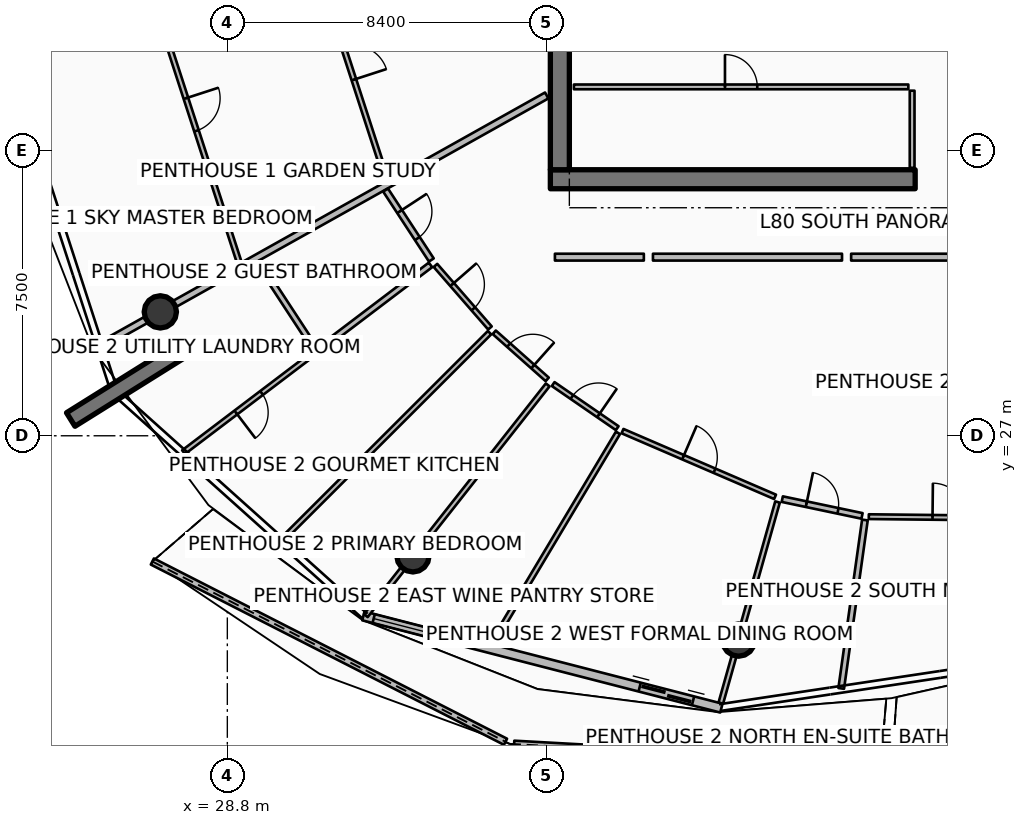
"""IFC4 building model, lengths in metres.
Left out: names, types, materials, properties, quantities, classifications, styles, units other than length and angle.
Written with IfcOpenShell. Run it as: python <this file> out.ifc"""

import sys

from ifc_helpers import new_model, si_unit, direction, frame, frame_2d, origin, origin_2d, place, context, subcontext, project, spatial, polyline, rectangle, circle, outline, extrude, element, fill, save


model = new_model("IFC4")
c1 = context("Model", 3, precision=1e-05, world=origin(), true_north=direction((0.0, 1.0)))
c2 = subcontext(c1, "Body", "Model", "MODEL_VIEW")
j1 = project(units=[si_unit("LENGTHUNIT", "METRE"), si_unit("PLANEANGLEUNIT", "RADIAN")], contexts=[c1])
p1 = place(None, origin())
s1 = spatial("IfcSite", under=j1, at=p1, CompositionType="ELEMENT")
p2 = place(p1, origin())
s2 = spatial("IfcBuilding", under=s1, at=p2, CompositionType="ELEMENT")
p3 = place(p2, frame((0.0, 0.0, 317.9)))
s3 = spatial("IfcBuildingStorey", under=s2, at=p3, CompositionType="ELEMENT", Elevation=317.9)
p4 = place(p3, frame((37.3, 33.75, 0.0), z_axis=(0.0, 0.0, 1.0), x_axis=(1.0, 0.0, 0.0)))
e1 = element("IfcWall", 1, at=p4, inside=s3, PredefinedType="SHEAR", context=c2, shape_type="SweptSolid", body=[
    extrude(rectangle(XDim=9.6, YDim=0.5, at=frame_2d((4.8, 0.0))), origin(), (0.0, 0.0, 1.0), 4.2),
])
p5 = place(p3, frame((37.55, 34.0, 0.0), z_axis=(0.0, 0.0, 1.0), x_axis=(0.0, 1.0, 0.0)))
e2 = element("IfcWall", 2, at=p5, inside=s3, PredefinedType="SHEAR", context=c2, shape_type="SweptSolid", body=[
    extrude(rectangle(XDim=16.0, YDim=0.5, at=frame_2d((8.0, 0.0))), origin(), (0.0, 0.0, 1.0), 4.2),
])
p6 = place(p3, frame((27.647, 29.282, 0.0), z_axis=(0.0, 0.0, 1.0), x_axis=(-0.848053161125, -0.529911158502, 0.0)))
e3 = element("IfcWall", 3, at=p6, inside=s3, PredefinedType="SOLIDWALL", context=c2, shape_type="SweptSolid", body=[
    extrude(rectangle(XDim=3.5, YDim=0.42, at=frame_2d((1.75, 0.0))), origin(), (0.0, 0.0, 1.0), 4.2),
])
for number, where, z_axis, x_axis in (
    (4, (27.037, 30.26, 0.0), (0.0, 0.0, 1.0), (1.0, 0.0, 0.0)),
    (5, (33.684, 23.841, 0.0), (0.0, 0.0, 1.0), (1.0, 0.0, 0.0)),
    (6, (42.253, 21.624, 0.0), (0.0, 0.0, 1.0), (1.0, 0.0, 0.0)),
):
    element("IfcColumn", number, at=place(p3, frame(where, z_axis=z_axis, x_axis=x_axis)), inside=s3, PredefinedType="COLUMN", context=c2, shape_type="SweptSolid", body=[
        extrude(circle(Radius=0.425, at=origin_2d()), origin(), (0.0, 0.0, 1.0), 3.94),
    ])
p7 = place(p3, frame((26.827, 23.692, 0.0), z_axis=(0.0, 0.0, 1.0), x_axis=(0.890680467367, -0.454629854993, 0.0)))
e7 = element("IfcWall", 7, at=p7, inside=s3, PredefinedType="PARAPET", context=c2, shape_type="SweptSolid", body=[
    extrude(outline(polyline([(0.0, 0.0), (10.434, 0.0), (10.433, 1.148), (5.217, 1.284), (0.0, 1.483), (0.0, 0.0)])), frame((0.0, 0.09, 0.0), z_axis=(0.0, -1.0, 0.0), x_axis=(1.0, 0.0, 0.0)), (0.0, 0.0, 1.0), 0.18),
])
p8 = place(p3, frame((36.347, 18.887, 0.0), z_axis=(0.0, 0.0, 1.0), x_axis=(0.998473232728, -0.055237700226, 0.0)))
e8 = element("IfcWall", 8, at=p8, inside=s3, PredefinedType="PARAPET", context=c2, shape_type="SweptSolid", body=[
    extrude(outline(polyline([(0.0, 0.0), (9.662, 0.0), (9.662, 1.224), (4.831, 1.127), (0.0, 1.148), (0.0, 0.0)])), frame((0.0, 0.09, 0.0), z_axis=(0.0, -1.0, 0.0), x_axis=(1.0, 0.0, 0.0)), (0.0, 0.0, 1.0), 0.18),
])
p9 = place(p3, frame((46.286, 18.383, 0.0), z_axis=(0.0, 0.0, 1.0), x_axis=(0.982839498698, 0.184462787028, 0.0)))
e9 = element("IfcWall", 9, at=p9, inside=s3, PredefinedType="PARAPET", context=c2, shape_type="SweptSolid", body=[
    extrude(outline(polyline([(0.0, 0.0), (8.882, 0.0), (8.882, 1.632), (4.441, 1.418), (0.0, 1.233), (0.0, 0.0)])), frame((0.0, 0.09, 0.0), z_axis=(0.0, -1.0, 0.0), x_axis=(1.0, 0.0, 0.0)), (0.0, 0.0, 1.0), 0.18),
])
p10 = place(p3, frame((32.38, 22.26, 0.0), z_axis=(0.0, 0.0, 1.0), x_axis=(0.968389076094, -0.249444577616, 0.0)))
e10 = element("IfcWall", 10, at=p10, inside=s3, PredefinedType="SOLIDWALL", context=c2, shape_type="SweptSolid", body=[
    extrude(rectangle(XDim=9.728, YDim=0.24, at=frame_2d((4.864, 0.0))), origin(), (0.0, 0.0, 1.0), 2.89),
])
p11 = place(p10, frame((7.508, 0.0, 0.0)))
e11 = element("IfcOpeningElement", 11, at=p11, cuts=e10, PredefinedType="OPENING", context=c2, shape_type="SweptSolid", body=[
    extrude(rectangle(XDim=1.45, YDim=2.15, at=frame_2d((0.725, 1.075))), frame((0.0, 0.13, 0.0), z_axis=(0.0, -1.0, 0.0), x_axis=(1.0, 0.0, 0.0)), (0.0, 0.0, 1.0), 0.26),
])
p12 = place(p10, frame((0.28, 0.0, 0.65)))
e12 = element("IfcOpeningElement", 12, at=p12, cuts=e10, PredefinedType="OPENING", context=c2, shape_type="SweptSolid", body=[
    extrude(rectangle(XDim=1.6, YDim=1.5, at=frame_2d((0.8, 0.75))), frame((0.0, 0.13, 0.0), z_axis=(0.0, -1.0, 0.0), x_axis=(1.0, 0.0, 0.0)), (0.0, 0.0, 1.0), 0.26),
])
p13 = place(p3, frame((46.82, 34.05, 0.0), z_axis=(0.0, 0.0, 1.0), x_axis=(0.0, 1.0, 0.0)))
e13 = element("IfcWall", 13, at=p13, inside=s3, PredefinedType="PARTITIONING", context=c2, shape_type="SweptSolid", body=[
    extrude(rectangle(XDim=2.03, YDim=0.125, at=frame_2d((1.015, 0.0))), origin(), (0.0, 0.0, 1.0), 3.38),
])
p14 = place(p3, frame((37.92, 36.18, 0.0), z_axis=(0.0, 0.0, 1.0), x_axis=(1.0, 0.0, 0.0)))
e14 = element("IfcWall", 14, at=p14, inside=s3, PredefinedType="PARTITIONING", context=c2, shape_type="SweptSolid", body=[
    extrude(rectangle(XDim=8.8, YDim=0.125, at=frame_2d((4.4, 0.0))), origin(), (0.0, 0.0, 1.0), 3.38),
])
p15 = place(p14, frame((3.975, 0.0, 0.0)))
e15 = element("IfcOpeningElement", 15, at=p15, cuts=e14, PredefinedType="OPENING", context=c2, shape_type="SweptSolid", body=[
    extrude(rectangle(XDim=0.85, YDim=2.06, at=frame_2d((0.425, 1.03))), frame((0.0, 0.073, 0.0), z_axis=(0.0, -1.0, 0.0), x_axis=(1.0, 0.0, 0.0)), (0.0, 0.0, 1.0), 0.145),
])
p16 = place(p3, frame((37.204, 35.954, 0.0), z_axis=(0.0, 0.0, 1.0), x_axis=(-0.872495191914, -0.488622697064, 0.0)))
e16 = element("IfcWall", 16, at=p16, inside=s3, PredefinedType="PARTITIONING", context=c2, shape_type="SweptSolid", body=[
    extrude(rectangle(XDim=13.462, YDim=0.18, at=frame_2d((6.731, 0.0))), origin(), (0.0, 0.0, 1.0), 3.38),
])
p17 = place(p3, frame((30.99, 39.878, 0.0), z_axis=(0.0, 0.0, 1.0), x_axis=(0.309026406972, -0.951053457905, 0.0)))
e17 = element("IfcWall", 17, at=p17, inside=s3, PredefinedType="PARTITIONING", context=c2, shape_type="SweptSolid", body=[
    extrude(rectangle(XDim=6.477, YDim=0.125, at=frame_2d((3.238, 0.0))), origin(), (0.0, 0.0, 1.0), 3.38),
])
p18 = place(p17, frame((2.788, 0.0, 0.0)))
e18 = element("IfcOpeningElement", 18, at=p18, cuts=e17, PredefinedType="OPENING", context=c2, shape_type="SweptSolid", body=[
    extrude(rectangle(XDim=0.9, YDim=2.08, at=frame_2d((0.45, 1.04))), frame((0.0, 0.073, 0.0), z_axis=(0.0, -1.0, 0.0), x_axis=(1.0, 0.0, 0.0)), (0.0, 0.0, 1.0), 0.145),
])
p19 = place(p3, frame((26.581, 39.356, 0.0), z_axis=(0.0, 0.0, 1.0), x_axis=(0.309000666789, -0.951061821294, 0.0)))
e19 = element("IfcWall", 19, at=p19, inside=s3, PredefinedType="PARTITIONING", context=c2, shape_type="SweptSolid", body=[
    extrude(rectangle(XDim=8.209, YDim=0.125, at=frame_2d((4.104, 0.0))), origin(), (0.0, 0.0, 1.0), 3.38),
])
p20 = place(p19, frame((3.655, 0.0, 0.0)))
e20 = element("IfcOpeningElement", 20, at=p20, cuts=e19, PredefinedType="OPENING", context=c2, shape_type="SweptSolid", body=[
    extrude(rectangle(XDim=0.9, YDim=2.08, at=frame_2d((0.45, 1.04))), frame((0.0, 0.073, 0.0), z_axis=(0.0, -1.0, 0.0), x_axis=(1.0, 0.0, 0.0)), (0.0, 0.0, 1.0), 0.145),
])
p21 = place(p3, frame((37.42, 31.7, 0.0), z_axis=(0.0, 0.0, 1.0), x_axis=(1.0, 0.0, 0.0)))
e21 = element("IfcWall", 21, at=p21, inside=s3, PredefinedType="PARTITIONING", context=c2, shape_type="SweptSolid", body=[
    extrude(rectangle(XDim=2.34, YDim=0.18, at=frame_2d((1.17, 0.0))), origin(), (0.0, 0.0, 1.0), 3.38),
])
p22 = place(p3, frame((32.964, 33.465, 0.0), z_axis=(0.0, 0.0, 1.0), x_axis=(0.547736904717, -0.836650633903, 0.0)))
e22 = element("IfcWall", 22, at=p22, inside=s3, PredefinedType="PARTITIONING", context=c2, shape_type="SweptSolid", body=[
    extrude(rectangle(XDim=2.199, YDim=0.15, at=frame_2d((1.099, 0.0))), origin(), (0.0, 0.0, 1.0), 3.38),
])
p23 = place(p22, frame((0.674, 0.0, 0.0)))
e23 = element("IfcOpeningElement", 23, at=p23, cuts=e22, PredefinedType="OPENING", context=c2, shape_type="SweptSolid", body=[
    extrude(rectangle(XDim=0.85, YDim=2.06, at=frame_2d((0.425, 1.03))), frame((0.0, 0.085, 0.0), z_axis=(0.0, -1.0, 0.0), x_axis=(1.0, 0.0, 0.0)), (0.0, 0.0, 1.0), 0.17),
])
p24 = place(p3, frame((29.605, 31.584, 0.0), z_axis=(0.0, 0.0, 1.0), x_axis=(0.547706970619, -0.836670230339, 0.0)))
e24 = element("IfcWall", 24, at=p24, inside=s3, PredefinedType="PARTITIONING", context=c2, shape_type="SweptSolid", body=[
    extrude(rectangle(XDim=2.731, YDim=0.15, at=frame_2d((1.365, 0.0))), origin(), (0.0, 0.0, 1.0), 3.38),
])
p25 = place(p3, frame((34.146, 31.496, 0.0), z_axis=(0.0, 0.0, 1.0), x_axis=(-0.796862333182, -0.60416092389, 0.0)))
e25 = element("IfcWall", 25, at=p25, inside=s3, PredefinedType="PARTITIONING", context=c2, shape_type="SweptSolid", body=[
    extrude(rectangle(XDim=3.72, YDim=0.15, at=frame_2d((1.86, 0.0))), origin(), (0.0, 0.0, 1.0), 3.38),
])
p26 = place(p3, frame((31.078, 29.17, 0.0), z_axis=(0.0, 0.0, 1.0), x_axis=(-0.796851341582, -0.604175421064, 0.0)))
e26 = element("IfcWall", 26, at=p26, inside=s3, PredefinedType="PARTITIONING", context=c2, shape_type="SweptSolid", body=[
    extrude(rectangle(XDim=4.304, YDim=0.125, at=frame_2d((2.152, 0.0))), origin(), (0.0, 0.0, 1.0), 3.38),
])
p27 = place(p26, frame((1.727, 0.0, 0.0)))
e27 = element("IfcOpeningElement", 27, at=p27, cuts=e26, PredefinedType="OPENING", context=c2, shape_type="SweptSolid", body=[
    extrude(rectangle(XDim=0.85, YDim=2.06, at=frame_2d((0.425, 1.03))), frame((0.0, 0.073, 0.0), z_axis=(0.0, -1.0, 0.0), x_axis=(1.0, 0.0, 0.0)), (0.0, 0.0, 1.0), 0.145),
])
p28 = place(p3, frame((35.7, 29.713, 0.0), z_axis=(0.0, 0.0, 1.0), x_axis=(-0.707470011435, -0.706743364256, 0.0)))
e28 = element("IfcWall", 28, at=p28, inside=s3, PredefinedType="PARTITIONING", context=c2, shape_type="SweptSolid", body=[
    extrude(rectangle(XDim=7.728, YDim=0.125, at=frame_2d((3.864, 0.0))), origin(), (0.0, 0.0, 1.0), 3.38),
])
p29 = place(p3, frame((34.277, 31.482, 0.0), z_axis=(0.0, 0.0, 1.0), x_axis=(0.656959210167, -0.753926121167, 0.0)))
e29 = element("IfcWall", 29, at=p29, inside=s3, PredefinedType="PARTITIONING", context=c2, shape_type="SweptSolid", body=[
    extrude(rectangle(XDim=2.183, YDim=0.125, at=frame_2d((1.091, 0.0))), origin(), (0.0, 0.0, 1.0), 3.38),
])
p30 = place(p29, frame((0.667, 0.0, 0.0)))
e30 = element("IfcOpeningElement", 30, at=p30, cuts=e29, PredefinedType="OPENING", context=c2, shape_type="SweptSolid", body=[
    extrude(rectangle(XDim=0.85, YDim=2.06, at=frame_2d((0.425, 1.03))), frame((0.0, 0.073, 0.0), z_axis=(0.0, -1.0, 0.0), x_axis=(1.0, 0.0, 0.0)), (0.0, 0.0, 1.0), 0.145),
])
p31 = place(p3, frame((35.823, 29.723, 0.0), z_axis=(0.0, 0.0, 1.0), x_axis=(0.747438201164, -0.664331344617, 0.0)))
e31 = element("IfcWall", 31, at=p31, inside=s3, PredefinedType="PARTITIONING", context=c2, shape_type="SweptSolid", body=[
    extrude(rectangle(XDim=1.865, YDim=0.125, at=frame_2d((0.933, 0.0))), origin(), (0.0, 0.0, 1.0), 3.38),
])
p32 = place(p31, frame((0.508, 0.0, 0.0)))
e32 = element("IfcOpeningElement", 32, at=p32, cuts=e31, PredefinedType="OPENING", context=c2, shape_type="SweptSolid", body=[
    extrude(rectangle(XDim=0.85, YDim=2.06, at=frame_2d((0.425, 1.03))), frame((0.0, 0.073, 0.0), z_axis=(0.0, -1.0, 0.0), x_axis=(1.0, 0.0, 0.0)), (0.0, 0.0, 1.0), 0.145),
])
p33 = place(p3, frame((40.0, 31.7, 0.0), z_axis=(0.0, 0.0, 1.0), x_axis=(1.0, 0.0, 0.0)))
e33 = element("IfcWall", 33, at=p33, inside=s3, PredefinedType="PARTITIONING", context=c2, shape_type="SweptSolid", body=[
    extrude(rectangle(XDim=4.975, YDim=0.18, at=frame_2d((2.488, 0.0))), origin(), (0.0, 0.0, 1.0), 3.38),
])
p34 = place(p3, frame((37.23, 28.339, 0.0), z_axis=(0.0, 0.0, 1.0), x_axis=(-0.619087123863, -0.785322311581, 0.0)))
e34 = element("IfcWall", 34, at=p34, inside=s3, PredefinedType="PARTITIONING", context=c2, shape_type="SweptSolid", body=[
    extrude(rectangle(XDim=7.731, YDim=0.125, at=frame_2d((3.865, 0.0))), origin(), (0.0, 0.0, 1.0), 3.38),
])
p35 = place(p3, frame((39.079, 27.077, 0.0), z_axis=(0.0, 0.0, 1.0), x_axis=(-0.513104404823, -0.858326202414, 0.0)))
e35 = element("IfcWall", 35, at=p35, inside=s3, PredefinedType="PARTITIONING", context=c2, shape_type="SweptSolid", body=[
    extrude(rectangle(XDim=6.48, YDim=0.125, at=frame_2d((3.24, 0.0))), origin(), (0.0, 0.0, 1.0), 3.38),
])
p36 = place(p3, frame((37.375, 28.361, 0.0), z_axis=(0.0, 0.0, 1.0), x_axis=(0.823529894266, -0.567272873712, 0.0)))
e36 = element("IfcWall", 36, at=p36, inside=s3, PredefinedType="PARTITIONING", context=c2, shape_type="SweptSolid", body=[
    extrude(rectangle(XDim=2.046, YDim=0.125, at=frame_2d((1.023, 0.0))), origin(), (0.0, 0.0, 1.0), 3.38),
])
p37 = place(p36, frame((0.598, 0.0, 0.0)))
e37 = element("IfcOpeningElement", 37, at=p37, cuts=e36, PredefinedType="OPENING", context=c2, shape_type="SweptSolid", body=[
    extrude(rectangle(XDim=0.85, YDim=2.06, at=frame_2d((0.425, 1.03))), frame((0.0, 0.073, 0.0), z_axis=(0.0, -1.0, 0.0), x_axis=(1.0, 0.0, 0.0)), (0.0, 0.0, 1.0), 0.145),
])
p38 = place(p3, frame((39.199, 27.123, 0.0), z_axis=(0.0, 0.0, 1.0), x_axis=(0.918386386282, -0.395684780466, 0.0)))
e38 = element("IfcWall", 38, at=p38, inside=s3, PredefinedType="PARTITIONING", context=c2, shape_type="SweptSolid", body=[
    extrude(rectangle(XDim=4.371, YDim=0.125, at=frame_2d((2.186, 0.0))), origin(), (0.0, 0.0, 1.0), 3.38),
])
p39 = place(p38, frame((1.736, 0.0, 0.0)))
e39 = element("IfcOpeningElement", 39, at=p39, cuts=e38, PredefinedType="OPENING", context=c2, shape_type="SweptSolid", body=[
    extrude(rectangle(XDim=0.9, YDim=2.08, at=frame_2d((0.45, 1.04))), frame((0.0, 0.073, 0.0), z_axis=(0.0, -1.0, 0.0), x_axis=(1.0, 0.0, 0.0)), (0.0, 0.0, 1.0), 0.145),
])
p40 = place(p3, frame((45.215, 31.7, 0.0), z_axis=(0.0, 0.0, 1.0), x_axis=(1.0, 0.0, 0.0)))
e40 = element("IfcWall", 40, at=p40, inside=s3, PredefinedType="PARTITIONING", context=c2, shape_type="SweptSolid", body=[
    extrude(rectangle(XDim=3.884, YDim=0.18, at=frame_2d((1.942, 0.0))), origin(), (0.0, 0.0, 1.0), 3.38),
])
p41 = place(p3, frame((43.278, 25.257, 0.0), z_axis=(0.0, 0.0, 1.0), x_axis=(-0.271458055223, -0.962450271055, 0.0)))
e41 = element("IfcWall", 41, at=p41, inside=s3, PredefinedType="PARTITIONING", context=c2, shape_type="SweptSolid", body=[
    extrude(rectangle(XDim=5.497, YDim=0.125, at=frame_2d((2.749, 0.0))), origin(), (0.0, 0.0, 1.0), 3.38),
])
p42 = place(p3, frame((43.403, 25.333, 0.0), z_axis=(0.0, 0.0, 1.0), x_axis=(0.978565484163, -0.205935895864, 0.0)))
e42 = element("IfcWall", 42, at=p42, inside=s3, PredefinedType="PARTITIONING", context=c2, shape_type="SweptSolid", body=[
    extrude(rectangle(XDim=2.145, YDim=0.15, at=frame_2d((1.072, 0.0))), origin(), (0.0, 0.0, 1.0), 3.38),
])
p43 = place(p42, frame((0.647, 0.0, 0.0)))
e43 = element("IfcOpeningElement", 43, at=p43, cuts=e42, PredefinedType="OPENING", context=c2, shape_type="SweptSolid", body=[
    extrude(rectangle(XDim=0.85, YDim=2.06, at=frame_2d((0.425, 1.03))), frame((0.0, 0.085, 0.0), z_axis=(0.0, -1.0, 0.0), x_axis=(1.0, 0.0, 0.0)), (0.0, 0.0, 1.0), 0.17),
])
p44 = place(p3, frame((45.577, 24.784, 0.0), z_axis=(0.0, 0.0, 1.0), x_axis=(-0.139343441712, -0.99024411397, 0.0)))
e44 = element("IfcWall", 44, at=p44, inside=s3, PredefinedType="PARTITIONING", context=c2, shape_type="SweptSolid", body=[
    extrude(rectangle(XDim=4.475, YDim=0.15, at=frame_2d((2.237, 0.0))), origin(), (0.0, 0.0, 1.0), 3.38),
])
p45 = place(p3, frame((45.68, 24.872, 0.0), z_axis=(0.0, 0.0, 1.0), x_axis=(0.99993989629, -0.010963749724, 0.0)))
e45 = element("IfcWall", 45, at=p45, inside=s3, PredefinedType="PARTITIONING", context=c2, shape_type="SweptSolid", body=[
    extrude(rectangle(XDim=4.253, YDim=0.125, at=frame_2d((2.126, 0.0))), origin(), (0.0, 0.0, 1.0), 3.38),
])
p46 = place(p45, frame((1.677, 0.0, 0.0)))
e46 = element("IfcOpeningElement", 46, at=p46, cuts=e45, PredefinedType="OPENING", context=c2, shape_type="SweptSolid", body=[
    extrude(rectangle(XDim=0.9, YDim=2.08, at=frame_2d((0.45, 1.04))), frame((0.0, 0.073, 0.0), z_axis=(0.0, -1.0, 0.0), x_axis=(1.0, 0.0, 0.0)), (0.0, 0.0, 1.0), 0.145),
])
p47 = place(p11, origin())
e47 = element("IfcDoor", 47, at=p47, inside=s3, OperationType="DOUBLE_DOOR_SLIDING", PredefinedType="DOOR", context=c2, shape_type="SweptSolid", body=[
    extrude(rectangle(XDim=1.45, YDim=2.15, at=frame_2d((0.725, 1.075))), frame((0.0, 0.025, 0.0), z_axis=(0.0, -1.0, 0.0), x_axis=(1.0, 0.0, 0.0)), (0.0, 0.0, 1.0), 0.05),
])
fill(e11, e47)
p48 = place(p12, origin())
e48 = element("IfcWindow", 48, at=p48, inside=s3, PartitioningType="SINGLE_PANEL", PredefinedType="WINDOW", context=c2, shape_type="SweptSolid", body=[
    extrude(rectangle(XDim=1.6, YDim=1.5, at=frame_2d((0.8, 0.75))), frame((0.0, 0.03, 0.0), z_axis=(0.0, -1.0, 0.0), x_axis=(1.0, 0.0, 0.0)), (0.0, 0.0, 1.0), 0.06),
])
fill(e12, e48)
p49 = place(p15, origin())
e49 = element("IfcDoor", 49, at=p49, inside=s3, OperationType="SINGLE_SWING_LEFT", PredefinedType="DOOR", context=c2, shape_type="SweptSolid", body=[
    extrude(rectangle(XDim=0.85, YDim=2.06, at=frame_2d((0.425, 1.03))), frame((0.0, 0.025, 0.0), z_axis=(0.0, -1.0, 0.0), x_axis=(1.0, 0.0, 0.0)), (0.0, 0.0, 1.0), 0.05),
])
fill(e15, e49)
p50 = place(p18, origin())
e50 = element("IfcDoor", 50, at=p50, inside=s3, OperationType="SINGLE_SWING_RIGHT", PredefinedType="DOOR", context=c2, shape_type="SweptSolid", body=[
    extrude(rectangle(XDim=0.9, YDim=2.08, at=frame_2d((0.45, 1.04))), frame((0.0, 0.025, 0.0), z_axis=(0.0, -1.0, 0.0), x_axis=(1.0, 0.0, 0.0)), (0.0, 0.0, 1.0), 0.05),
])
fill(e18, e50)
p51 = place(p20, origin())
e51 = element("IfcDoor", 51, at=p51, inside=s3, OperationType="SINGLE_SWING_LEFT", PredefinedType="DOOR", context=c2, shape_type="SweptSolid", body=[
    extrude(rectangle(XDim=0.9, YDim=2.08, at=frame_2d((0.45, 1.04))), frame((0.0, 0.025, 0.0), z_axis=(0.0, -1.0, 0.0), x_axis=(1.0, 0.0, 0.0)), (0.0, 0.0, 1.0), 0.05),
])
fill(e20, e51)
p52 = place(p23, origin())
e52 = element("IfcDoor", 52, at=p52, inside=s3, OperationType="SINGLE_SWING_LEFT", PredefinedType="DOOR", context=c2, shape_type="SweptSolid", body=[
    extrude(rectangle(XDim=0.85, YDim=2.06, at=frame_2d((0.425, 1.03))), frame((0.0, 0.025, 0.0), z_axis=(0.0, -1.0, 0.0), x_axis=(1.0, 0.0, 0.0)), (0.0, 0.0, 1.0), 0.05),
])
fill(e23, e52)
p53 = place(p27, origin())
e53 = element("IfcDoor", 53, at=p53, inside=s3, OperationType="SINGLE_SWING_RIGHT", PredefinedType="DOOR", context=c2, shape_type="SweptSolid", body=[
    extrude(rectangle(XDim=0.85, YDim=2.06, at=frame_2d((0.425, 1.03))), frame((0.0, 0.025, 0.0), z_axis=(0.0, -1.0, 0.0), x_axis=(1.0, 0.0, 0.0)), (0.0, 0.0, 1.0), 0.05),
])
fill(e27, e53)
p54 = place(p30, origin())
e54 = element("IfcDoor", 54, at=p54, inside=s3, OperationType="SINGLE_SWING_LEFT", PredefinedType="DOOR", context=c2, shape_type="SweptSolid", body=[
    extrude(rectangle(XDim=0.85, YDim=2.06, at=frame_2d((0.425, 1.03))), frame((0.0, 0.025, 0.0), z_axis=(0.0, -1.0, 0.0), x_axis=(1.0, 0.0, 0.0)), (0.0, 0.0, 1.0), 0.05),
])
fill(e30, e54)
p55 = place(p32, origin())
e55 = element("IfcDoor", 55, at=p55, inside=s3, OperationType="SINGLE_SWING_RIGHT", PredefinedType="DOOR", context=c2, shape_type="SweptSolid", body=[
    extrude(rectangle(XDim=0.85, YDim=2.06, at=frame_2d((0.425, 1.03))), frame((0.0, 0.025, 0.0), z_axis=(0.0, -1.0, 0.0), x_axis=(1.0, 0.0, 0.0)), (0.0, 0.0, 1.0), 0.05),
])
fill(e32, e55)
p56 = place(p37, origin())
e56 = element("IfcDoor", 56, at=p56, inside=s3, OperationType="SINGLE_SWING_RIGHT", PredefinedType="DOOR", context=c2, shape_type="SweptSolid", body=[
    extrude(rectangle(XDim=0.85, YDim=2.06, at=frame_2d((0.425, 1.03))), frame((0.0, 0.025, 0.0), z_axis=(0.0, -1.0, 0.0), x_axis=(1.0, 0.0, 0.0)), (0.0, 0.0, 1.0), 0.05),
])
fill(e37, e56)
p57 = place(p39, origin())
e57 = element("IfcDoor", 57, at=p57, inside=s3, OperationType="SINGLE_SWING_LEFT", PredefinedType="DOOR", context=c2, shape_type="SweptSolid", body=[
    extrude(rectangle(XDim=0.9, YDim=2.08, at=frame_2d((0.45, 1.04))), frame((0.0, 0.025, 0.0), z_axis=(0.0, -1.0, 0.0), x_axis=(1.0, 0.0, 0.0)), (0.0, 0.0, 1.0), 0.05),
])
fill(e39, e57)
p58 = place(p43, origin())
e58 = element("IfcDoor", 58, at=p58, inside=s3, OperationType="SINGLE_SWING_LEFT", PredefinedType="DOOR", context=c2, shape_type="SweptSolid", body=[
    extrude(rectangle(XDim=0.85, YDim=2.06, at=frame_2d((0.425, 1.03))), frame((0.0, 0.025, 0.0), z_axis=(0.0, -1.0, 0.0), x_axis=(1.0, 0.0, 0.0)), (0.0, 0.0, 1.0), 0.05),
])
fill(e43, e58)
p59 = place(p46, origin())
e59 = element("IfcDoor", 59, at=p59, inside=s3, OperationType="SINGLE_SWING_LEFT", PredefinedType="DOOR", context=c2, shape_type="SweptSolid", body=[
    extrude(rectangle(XDim=0.9, YDim=2.08, at=frame_2d((0.45, 1.04))), frame((0.0, 0.025, 0.0), z_axis=(0.0, -1.0, 0.0), x_axis=(1.0, 0.0, 0.0)), (0.0, 0.0, 1.0), 0.05),
])
fill(e46, e59)
save(model, sys.argv[1])
